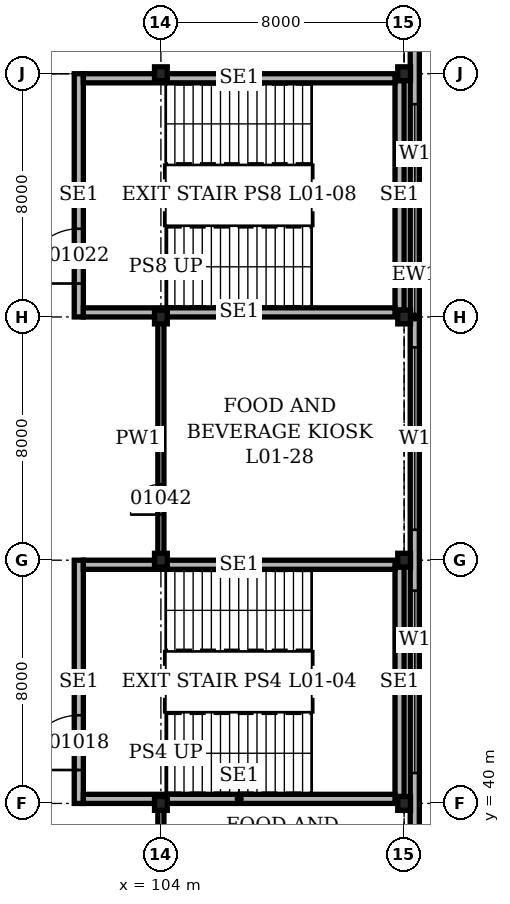
"""IFC4 building model, lengths in metres.
Left out: names, types, materials, properties, quantities, classifications, styles, units other than length and angle.
Written with IfcOpenShell. Run it as: python <this file> out.ifc"""

import sys

from ifc_helpers import new_model, si_unit, direction, frame, frame_2d, origin, origin_2d, place, context, subcontext, project, spatial, rectangle, i_section, extrude, element, fill, save


model = new_model("IFC4")
c1 = context("Model", 3, precision=1e-05, world=origin(), true_north=direction((0.0, 1.0)))
c2 = subcontext(c1, "Body", "Model", "MODEL_VIEW")
j1 = project(units=[si_unit("LENGTHUNIT", "METRE"), si_unit("PLANEANGLEUNIT", "RADIAN")], contexts=[c1])
p1 = place(None, origin())
s1 = spatial("IfcSite", under=j1, at=p1, CompositionType="ELEMENT")
p2 = place(p1, origin())
s2 = spatial("IfcBuilding", under=s1, at=p2, CompositionType="ELEMENT")
p3 = place(p2, frame((0.0, 0.0, 4.9)))
s3 = spatial("IfcBuildingStorey", under=s2, at=p3, CompositionType="ELEMENT", Elevation=4.9)
for number, where, z_axis, x_axis in (
    (1, (104.0, 40.0, 0.0), (0.0, 0.0, 1.0), (1.0, 0.0, 0.0)),
    (2, (104.0, 48.0, 0.0), (0.0, 0.0, 1.0), (1.0, 0.0, 0.0)),
    (3, (104.0, 56.0, 0.0), (0.0, 0.0, 1.0), (1.0, 0.0, 0.0)),
    (4, (104.0, 64.0, 0.0), (0.0, 0.0, 1.0), (1.0, 0.0, 0.0)),
    (5, (112.0, 40.0, 0.0), (0.0, 0.0, 1.0), (1.0, 0.0, 0.0)),
    (6, (112.0, 48.0, 0.0), (0.0, 0.0, 1.0), (1.0, 0.0, 0.0)),
    (7, (112.0, 56.0, 0.0), (0.0, 0.0, 1.0), (1.0, 0.0, 0.0)),
    (8, (112.0, 64.0, 0.0), (0.0, 0.0, 1.0), (1.0, 0.0, 0.0)),
):
    element("IfcColumn", number, at=place(p3, frame(where, z_axis=z_axis, x_axis=x_axis)), inside=s3, PredefinedType="COLUMN", context=c2, shape_type="SweptSolid", body=[
        extrude(i_section(OverallWidth=0.419, OverallDepth=0.455, WebThickness=0.042, FlangeThickness=0.068, at=origin_2d()), origin(), (0.0, 0.0, 1.0), 5.0),
    ])
p4 = place(p3, frame((112.35, -0.35, 0.0), z_axis=(0.0, 0.0, 1.0), x_axis=(0.0, 1.0, 0.0)))
e9 = element("IfcWall", 9, at=p4, inside=s3, PredefinedType="SOLIDWALL", context=c2, shape_type="SweptSolid", body=[
    extrude(rectangle(XDim=112.7, YDim=0.3, at=frame_2d((56.35, 0.0))), origin(), (0.0, 0.0, 1.0), 5.0),
])
p5 = place(p4, frame((1.35, 0.0, 1.0)))
e10 = element("IfcOpeningElement", 10, at=p5, cuts=e9, PredefinedType="OPENING", context=c2, shape_type="SweptSolid", body=[
    extrude(rectangle(XDim=6.0, YDim=1.5, at=frame_2d((3.0, 0.75))), frame((0.0, 0.16, 0.0), z_axis=(0.0, -1.0, 0.0), x_axis=(1.0, 0.0, 0.0)), (0.0, 0.0, 1.0), 0.32),
])
p6 = place(p4, frame((9.35, 0.0, 1.0)))
e11 = element("IfcOpeningElement", 11, at=p6, cuts=e9, PredefinedType="OPENING", context=c2, shape_type="SweptSolid", body=[
    extrude(rectangle(XDim=6.0, YDim=1.5, at=frame_2d((3.0, 0.75))), frame((0.0, 0.16, 0.0), z_axis=(0.0, -1.0, 0.0), x_axis=(1.0, 0.0, 0.0)), (0.0, 0.0, 1.0), 0.32),
])
p7 = place(p4, frame((17.35, 0.0, 1.0)))
e12 = element("IfcOpeningElement", 12, at=p7, cuts=e9, PredefinedType="OPENING", context=c2, shape_type="SweptSolid", body=[
    extrude(rectangle(XDim=6.0, YDim=1.5, at=frame_2d((3.0, 0.75))), frame((0.0, 0.16, 0.0), z_axis=(0.0, -1.0, 0.0), x_axis=(1.0, 0.0, 0.0)), (0.0, 0.0, 1.0), 0.32),
])
p8 = place(p4, frame((25.35, 0.0, 1.0)))
e13 = element("IfcOpeningElement", 13, at=p8, cuts=e9, PredefinedType="OPENING", context=c2, shape_type="SweptSolid", body=[
    extrude(rectangle(XDim=6.0, YDim=1.5, at=frame_2d((3.0, 0.75))), frame((0.0, 0.16, 0.0), z_axis=(0.0, -1.0, 0.0), x_axis=(1.0, 0.0, 0.0)), (0.0, 0.0, 1.0), 0.32),
])
p9 = place(p4, frame((33.35, 0.0, 1.0)))
e14 = element("IfcOpeningElement", 14, at=p9, cuts=e9, PredefinedType="OPENING", context=c2, shape_type="SweptSolid", body=[
    extrude(rectangle(XDim=6.0, YDim=1.5, at=frame_2d((3.0, 0.75))), frame((0.0, 0.16, 0.0), z_axis=(0.0, -1.0, 0.0), x_axis=(1.0, 0.0, 0.0)), (0.0, 0.0, 1.0), 0.32),
])
p10 = place(p4, frame((41.35, 0.0, 1.0)))
e15 = element("IfcOpeningElement", 15, at=p10, cuts=e9, PredefinedType="OPENING", context=c2, shape_type="SweptSolid", body=[
    extrude(rectangle(XDim=6.0, YDim=1.5, at=frame_2d((3.0, 0.75))), frame((0.0, 0.16, 0.0), z_axis=(0.0, -1.0, 0.0), x_axis=(1.0, 0.0, 0.0)), (0.0, 0.0, 1.0), 0.32),
])
p11 = place(p4, frame((49.35, 0.0, 1.0)))
e16 = element("IfcOpeningElement", 16, at=p11, cuts=e9, PredefinedType="OPENING", context=c2, shape_type="SweptSolid", body=[
    extrude(rectangle(XDim=6.0, YDim=1.5, at=frame_2d((3.0, 0.75))), frame((0.0, 0.16, 0.0), z_axis=(0.0, -1.0, 0.0), x_axis=(1.0, 0.0, 0.0)), (0.0, 0.0, 1.0), 0.32),
])
p12 = place(p4, frame((57.35, 0.0, 1.0)))
e17 = element("IfcOpeningElement", 17, at=p12, cuts=e9, PredefinedType="OPENING", context=c2, shape_type="SweptSolid", body=[
    extrude(rectangle(XDim=6.0, YDim=1.5, at=frame_2d((3.0, 0.75))), frame((0.0, 0.16, 0.0), z_axis=(0.0, -1.0, 0.0), x_axis=(1.0, 0.0, 0.0)), (0.0, 0.0, 1.0), 0.32),
])
p13 = place(p4, frame((65.35, 0.0, 1.0)))
e18 = element("IfcOpeningElement", 18, at=p13, cuts=e9, PredefinedType="OPENING", context=c2, shape_type="SweptSolid", body=[
    extrude(rectangle(XDim=6.0, YDim=1.5, at=frame_2d((3.0, 0.75))), frame((0.0, 0.16, 0.0), z_axis=(0.0, -1.0, 0.0), x_axis=(1.0, 0.0, 0.0)), (0.0, 0.0, 1.0), 0.32),
])
p14 = place(p4, frame((73.35, 0.0, 1.0)))
e19 = element("IfcOpeningElement", 19, at=p14, cuts=e9, PredefinedType="OPENING", context=c2, shape_type="SweptSolid", body=[
    extrude(rectangle(XDim=6.0, YDim=1.5, at=frame_2d((3.0, 0.75))), frame((0.0, 0.16, 0.0), z_axis=(0.0, -1.0, 0.0), x_axis=(1.0, 0.0, 0.0)), (0.0, 0.0, 1.0), 0.32),
])
p15 = place(p4, frame((81.35, 0.0, 1.0)))
e20 = element("IfcOpeningElement", 20, at=p15, cuts=e9, PredefinedType="OPENING", context=c2, shape_type="SweptSolid", body=[
    extrude(rectangle(XDim=6.0, YDim=1.5, at=frame_2d((3.0, 0.75))), frame((0.0, 0.16, 0.0), z_axis=(0.0, -1.0, 0.0), x_axis=(1.0, 0.0, 0.0)), (0.0, 0.0, 1.0), 0.32),
])
p16 = place(p4, frame((89.35, 0.0, 1.0)))
e21 = element("IfcOpeningElement", 21, at=p16, cuts=e9, PredefinedType="OPENING", context=c2, shape_type="SweptSolid", body=[
    extrude(rectangle(XDim=6.0, YDim=1.5, at=frame_2d((3.0, 0.75))), frame((0.0, 0.16, 0.0), z_axis=(0.0, -1.0, 0.0), x_axis=(1.0, 0.0, 0.0)), (0.0, 0.0, 1.0), 0.32),
])
p17 = place(p4, frame((97.35, 0.0, 1.0)))
e22 = element("IfcOpeningElement", 22, at=p17, cuts=e9, PredefinedType="OPENING", context=c2, shape_type="SweptSolid", body=[
    extrude(rectangle(XDim=6.0, YDim=1.5, at=frame_2d((3.0, 0.75))), frame((0.0, 0.16, 0.0), z_axis=(0.0, -1.0, 0.0), x_axis=(1.0, 0.0, 0.0)), (0.0, 0.0, 1.0), 0.32),
])
p18 = place(p4, frame((105.35, 0.0, 1.0)))
e23 = element("IfcOpeningElement", 23, at=p18, cuts=e9, PredefinedType="OPENING", context=c2, shape_type="SweptSolid", body=[
    extrude(rectangle(XDim=6.0, YDim=1.5, at=frame_2d((3.0, 0.75))), frame((0.0, 0.16, 0.0), z_axis=(0.0, -1.0, 0.0), x_axis=(1.0, 0.0, 0.0)), (0.0, 0.0, 1.0), 0.32),
])
p19 = place(p3, frame((101.3, 40.0, 0.0), z_axis=(0.0, 0.0, 1.0), x_axis=(0.0, 1.0, 0.0)))
e24 = element("IfcWall", 24, at=p19, inside=s3, PredefinedType="SOLIDWALL", context=c2, shape_type="SweptSolid", body=[
    extrude(rectangle(XDim=8.0, YDim=0.3, at=frame_2d((4.0, 0.0))), origin(), (0.0, 0.0, 1.0), 4.8),
])
p20 = place(p19, frame((1.1, 0.0, 0.0)))
e25 = element("IfcOpeningElement", 25, at=p20, cuts=e24, PredefinedType="OPENING", context=c2, shape_type="SweptSolid", body=[
    extrude(rectangle(XDim=1.8, YDim=2.1, at=frame_2d((0.9, 1.05))), frame((0.0, 0.16, 0.0), z_axis=(0.0, -1.0, 0.0), x_axis=(1.0, 0.0, 0.0)), (0.0, 0.0, 1.0), 0.32),
])
p21 = place(p3, frame((111.85, 40.227, 0.0), z_axis=(0.0, 0.0, 1.0), x_axis=(0.0, 1.0, 0.0)))
e26 = element("IfcWall", 26, at=p21, inside=s3, PredefinedType="SOLIDWALL", context=c2, shape_type="SweptSolid", body=[
    extrude(rectangle(XDim=7.545, YDim=0.3, at=frame_2d((3.773, 0.0))), origin(), (0.0, 0.0, 1.0), 4.8),
])
for number, where, z_axis, x_axis in (
    (27, (101.45, 40.15, 0.0), (0.0, 0.0, 1.0), (1.0, 0.0, 0.0)),
    (28, (101.45, 47.85, 0.0), (0.0, 0.0, 1.0), (1.0, 0.0, 0.0)),
):
    element("IfcWall", number, at=place(p3, frame(where, z_axis=z_axis, x_axis=x_axis)), inside=s3, PredefinedType="SOLIDWALL", context=c2, shape_type="SweptSolid", body=[
        extrude(rectangle(XDim=10.25, YDim=0.3, at=frame_2d((5.125, 0.0))), origin(), (0.0, 0.0, 1.0), 4.8),
    ])
p22 = place(p3, frame((101.3, 56.0, 0.0), z_axis=(0.0, 0.0, 1.0), x_axis=(0.0, 1.0, 0.0)))
e29 = element("IfcWall", 29, at=p22, inside=s3, PredefinedType="SOLIDWALL", context=c2, shape_type="SweptSolid", body=[
    extrude(rectangle(XDim=8.0, YDim=0.3, at=frame_2d((4.0, 0.0))), origin(), (0.0, 0.0, 1.0), 4.8),
])
p23 = place(p22, frame((1.1, 0.0, 0.0)))
e30 = element("IfcOpeningElement", 30, at=p23, cuts=e29, PredefinedType="OPENING", context=c2, shape_type="SweptSolid", body=[
    extrude(rectangle(XDim=1.8, YDim=2.1, at=frame_2d((0.9, 1.05))), frame((0.0, 0.16, 0.0), z_axis=(0.0, -1.0, 0.0), x_axis=(1.0, 0.0, 0.0)), (0.0, 0.0, 1.0), 0.32),
])
p24 = place(p3, frame((111.85, 56.227, 0.0), z_axis=(0.0, 0.0, 1.0), x_axis=(0.0, 1.0, 0.0)))
e31 = element("IfcWall", 31, at=p24, inside=s3, PredefinedType="SOLIDWALL", context=c2, shape_type="SweptSolid", body=[
    extrude(rectangle(XDim=7.545, YDim=0.3, at=frame_2d((3.773, 0.0))), origin(), (0.0, 0.0, 1.0), 4.8),
])
for number, where, z_axis, x_axis in (
    (32, (101.45, 56.15, 0.0), (0.0, 0.0, 1.0), (1.0, 0.0, 0.0)),
    (33, (101.45, 63.85, 0.0), (0.0, 0.0, 1.0), (1.0, 0.0, 0.0)),
):
    element("IfcWall", number, at=place(p3, frame(where, z_axis=z_axis, x_axis=x_axis)), inside=s3, PredefinedType="SOLIDWALL", context=c2, shape_type="SweptSolid", body=[
        extrude(rectangle(XDim=10.25, YDim=0.3, at=frame_2d((5.125, 0.0))), origin(), (0.0, 0.0, 1.0), 4.8),
    ])
p25 = place(p3, frame((104.0, -0.15, 0.0), z_axis=(0.0, 0.0, 1.0), x_axis=(0.0, 1.0, 0.0)))
e34 = element("IfcWall", 34, at=p25, inside=s3, PredefinedType="PARTITIONING", context=c2, shape_type="SweptSolid", body=[
    extrude(rectangle(XDim=40.05, YDim=0.2, at=frame_2d((20.025, 0.0))), origin(), (0.0, 0.0, 1.0), 4.028),
])
p26 = place(p25, frame((17.55, 0.0, 0.0)))
e35 = element("IfcOpeningElement", 35, at=p26, cuts=e34, PredefinedType="OPENING", context=c2, shape_type="SweptSolid", body=[
    extrude(rectangle(XDim=1.2, YDim=2.1, at=frame_2d((0.6, 1.05))), frame((0.0, 0.11, 0.0), z_axis=(0.0, -1.0, 0.0), x_axis=(1.0, 0.0, 0.0)), (0.0, 0.0, 1.0), 0.22),
])
p27 = place(p25, frame((27.05, 0.0, 0.0)))
e36 = element("IfcOpeningElement", 36, at=p27, cuts=e34, PredefinedType="OPENING", context=c2, shape_type="SweptSolid", body=[
    extrude(rectangle(XDim=1.2, YDim=2.1, at=frame_2d((0.6, 1.05))), frame((0.0, 0.11, 0.0), z_axis=(0.0, -1.0, 0.0), x_axis=(1.0, 0.0, 0.0)), (0.0, 0.0, 1.0), 0.22),
])
p28 = place(p25, frame((33.55, 0.0, 0.0)))
e37 = element("IfcOpeningElement", 37, at=p28, cuts=e34, PredefinedType="OPENING", context=c2, shape_type="SweptSolid", body=[
    extrude(rectangle(XDim=1.2, YDim=2.1, at=frame_2d((0.6, 1.05))), frame((0.0, 0.11, 0.0), z_axis=(0.0, -1.0, 0.0), x_axis=(1.0, 0.0, 0.0)), (0.0, 0.0, 1.0), 0.22),
])
p29 = place(p25, frame((1.65, 0.0, 0.0)))
e38 = element("IfcOpeningElement", 38, at=p29, cuts=e34, PredefinedType="OPENING", context=c2, shape_type="SweptSolid", body=[
    extrude(rectangle(XDim=1.0, YDim=2.1, at=frame_2d((0.5, 1.05))), frame((0.0, 0.11, 0.0), z_axis=(0.0, -1.0, 0.0), x_axis=(1.0, 0.0, 0.0)), (0.0, 0.0, 1.0), 0.22),
])
p30 = place(p25, frame((37.65, 0.0, 0.0)))
e39 = element("IfcOpeningElement", 39, at=p30, cuts=e34, PredefinedType="OPENING", context=c2, shape_type="SweptSolid", body=[
    extrude(rectangle(XDim=1.0, YDim=2.1, at=frame_2d((0.5, 1.05))), frame((0.0, 0.11, 0.0), z_axis=(0.0, -1.0, 0.0), x_axis=(1.0, 0.0, 0.0)), (0.0, 0.0, 1.0), 0.22),
])
p31 = place(p3, frame((104.0, 48.1, 0.0), z_axis=(0.0, 0.0, 1.0), x_axis=(0.0, 1.0, 0.0)))
e40 = element("IfcWall", 40, at=p31, inside=s3, PredefinedType="PARTITIONING", context=c2, shape_type="SweptSolid", body=[
    extrude(rectangle(XDim=7.8, YDim=0.2, at=frame_2d((3.9, 0.0))), origin(), (0.0, 0.0, 1.0), 4.028),
])
p32 = place(p31, frame((1.4, 0.0, 0.0)))
e41 = element("IfcOpeningElement", 41, at=p32, cuts=e40, PredefinedType="OPENING", context=c2, shape_type="SweptSolid", body=[
    extrude(rectangle(XDim=1.0, YDim=2.1, at=frame_2d((0.5, 1.05))), frame((0.0, 0.11, 0.0), z_axis=(0.0, -1.0, 0.0), x_axis=(1.0, 0.0, 0.0)), (0.0, 0.0, 1.0), 0.22),
])
p33 = place(p10, origin())
e42 = element("IfcWindow", 42, at=p33, inside=s3, PartitioningType="SINGLE_PANEL", PredefinedType="WINDOW", context=c2, shape_type="SweptSolid", body=[
    extrude(rectangle(XDim=6.0, YDim=1.5, at=frame_2d((3.0, 0.75))), frame((0.0, 0.03, 0.0), z_axis=(0.0, -1.0, 0.0), x_axis=(1.0, 0.0, 0.0)), (0.0, 0.0, 1.0), 0.06),
])
fill(e15, e42)
p34 = place(p11, origin())
e43 = element("IfcWindow", 43, at=p34, inside=s3, PartitioningType="SINGLE_PANEL", PredefinedType="WINDOW", context=c2, shape_type="SweptSolid", body=[
    extrude(rectangle(XDim=6.0, YDim=1.5, at=frame_2d((3.0, 0.75))), frame((0.0, 0.03, 0.0), z_axis=(0.0, -1.0, 0.0), x_axis=(1.0, 0.0, 0.0)), (0.0, 0.0, 1.0), 0.06),
])
fill(e16, e43)
p35 = place(p12, origin())
e44 = element("IfcWindow", 44, at=p35, inside=s3, PartitioningType="SINGLE_PANEL", PredefinedType="WINDOW", context=c2, shape_type="SweptSolid", body=[
    extrude(rectangle(XDim=6.0, YDim=1.5, at=frame_2d((3.0, 0.75))), frame((0.0, 0.03, 0.0), z_axis=(0.0, -1.0, 0.0), x_axis=(1.0, 0.0, 0.0)), (0.0, 0.0, 1.0), 0.06),
])
fill(e17, e44)
p36 = place(p20, origin())
e45 = element("IfcDoor", 45, at=p36, inside=s3, OperationType="DOUBLE_DOOR_SINGLE_SWING", PredefinedType="DOOR", context=c2, shape_type="SweptSolid", body=[
    extrude(rectangle(XDim=1.8, YDim=2.1, at=frame_2d((0.9, 1.05))), frame((0.0, 0.15, 0.0), z_axis=(0.0, -1.0, 0.0), x_axis=(1.0, 0.0, 0.0)), (0.0, 0.0, 1.0), 0.3),
])
fill(e25, e45)
p37 = place(p23, origin())
e46 = element("IfcDoor", 46, at=p37, inside=s3, OperationType="DOUBLE_DOOR_SINGLE_SWING", PredefinedType="DOOR", context=c2, shape_type="SweptSolid", body=[
    extrude(rectangle(XDim=1.8, YDim=2.1, at=frame_2d((0.9, 1.05))), frame((0.0, 0.15, 0.0), z_axis=(0.0, -1.0, 0.0), x_axis=(1.0, 0.0, 0.0)), (0.0, 0.0, 1.0), 0.3),
])
fill(e30, e46)
p38 = place(p32, origin())
e47 = element("IfcDoor", 47, at=p38, inside=s3, OperationType="SINGLE_SWING_LEFT", PredefinedType="DOOR", context=c2, shape_type="SweptSolid", body=[
    extrude(rectangle(XDim=1.0, YDim=2.1, at=frame_2d((0.5, 1.05))), frame((0.0, 0.1, 0.0), z_axis=(0.0, -1.0, 0.0), x_axis=(1.0, 0.0, 0.0)), (0.0, 0.0, 1.0), 0.199),
])
fill(e41, e47)
save(model, sys.argv[1])
